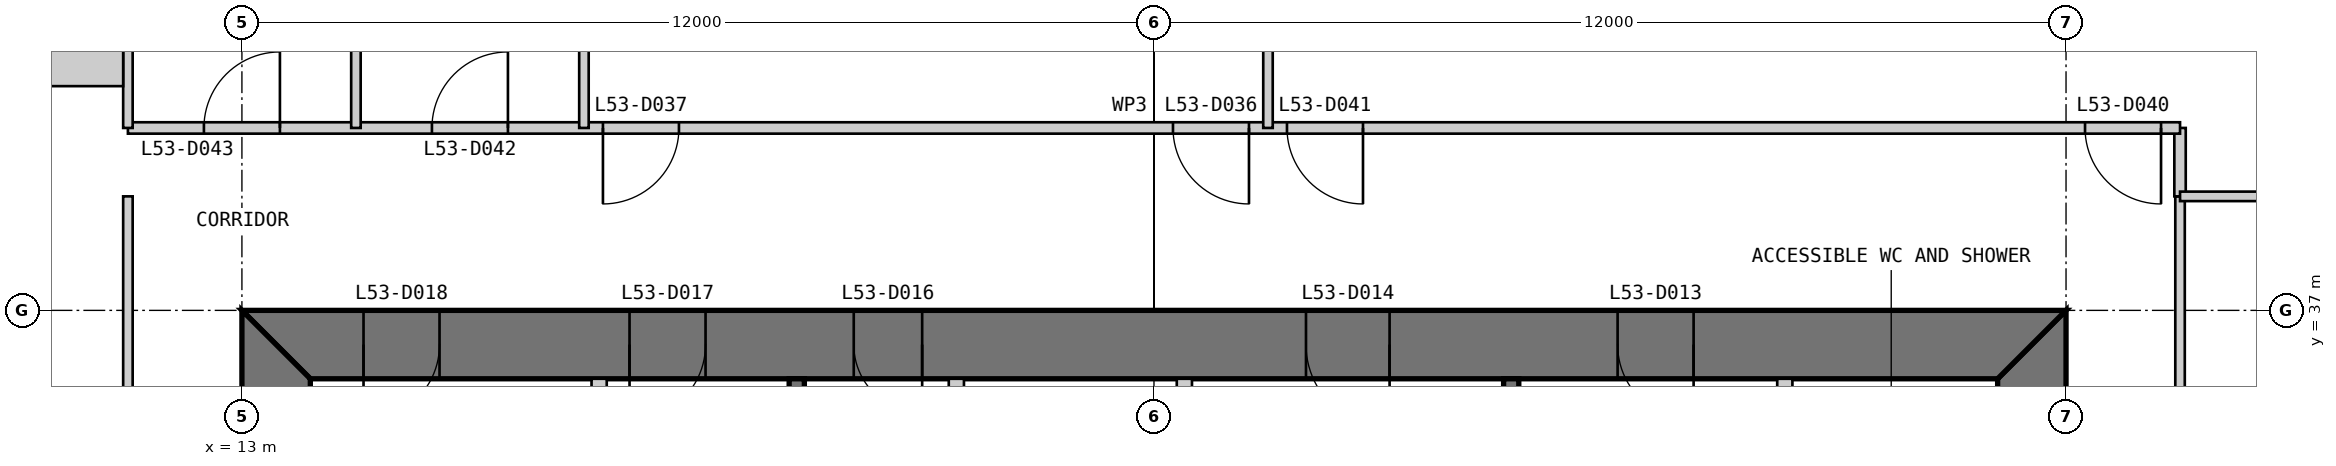
"""IFC4 building model, lengths in metres.
Left out: names, types, materials, properties, quantities, classifications, styles, units other than length and angle.
Written with IfcOpenShell. Run it as: python <this file> out.ifc"""

import sys

from ifc_helpers import new_model, si_unit, direction, frame, frame_2d, origin, place, context, subcontext, project, spatial, polyline, rectangle, outline, extrude, element, fill, save


model = new_model("IFC4")
c1 = context("Model", 3, precision=1e-05, world=origin(), true_north=direction((0.0, 1.0)))
c2 = subcontext(c1, "Body", "Model", "MODEL_VIEW")
j1 = project(units=[si_unit("LENGTHUNIT", "METRE"), si_unit("PLANEANGLEUNIT", "RADIAN")], contexts=[c1])
p1 = place(None, origin())
s1 = spatial("IfcSite", under=j1, at=p1, CompositionType="ELEMENT")
p2 = place(p1, origin())
s2 = spatial("IfcBuilding", under=s1, at=p2, CompositionType="ELEMENT")
p3 = place(p2, frame((0.0, 0.0, 225.8)))
s3 = spatial("IfcBuildingStorey", under=s2, at=p3, CompositionType="ELEMENT", Elevation=225.8)
p4 = place(p3, frame((36.55, 13.9, 0.0), z_axis=(0.0, 0.0, 1.0), x_axis=(0.0, 1.0, 0.0)))
e1 = element("IfcWall", 1, at=p4, inside=s3, PredefinedType="SHEAR", context=c2, shape_type="SweptSolid", body=[
    extrude(outline(polyline([(-0.9, -0.45), (23.1, -0.45), (22.2, 0.45), (0.0, 0.45), (-0.9, -0.45)])), origin(), (0.0, 0.0, 1.0), 4.0),
])
p5 = place(p4, frame((20.2, 0.0, 0.0)))
e2 = element("IfcOpeningElement", 2, at=p5, cuts=e1, PredefinedType="OPENING", context=c2, shape_type="SweptSolid", body=[
    extrude(rectangle(XDim=1.0, YDim=2.2, at=frame_2d((0.5, 1.1))), frame((0.0, 0.46, 0.0), z_axis=(0.0, -1.0, 0.0), x_axis=(1.0, 0.0, 0.0)), (0.0, 0.0, 1.0), 0.92),
])
p6 = place(p4, frame((17.25, 0.0, 0.0)))
e3 = element("IfcOpeningElement", 3, at=p6, cuts=e1, PredefinedType="OPENING", context=c2, shape_type="SweptSolid", body=[
    extrude(rectangle(XDim=0.9, YDim=2.2, at=frame_2d((0.45, 1.1))), frame((0.0, 0.46, 0.0), z_axis=(0.0, -1.0, 0.0), x_axis=(1.0, 0.0, 0.0)), (0.0, 0.0, 1.0), 0.92),
])
p7 = place(p3, frame((37.0, 36.55, 0.0), z_axis=(0.0, 0.0, 1.0), x_axis=(-1.0, 0.0, 0.0)))
e4 = element("IfcWall", 4, at=p7, inside=s3, PredefinedType="SHEAR", context=c2, shape_type="SweptSolid", body=[
    extrude(outline(polyline([(0.0, -0.45), (24.0, -0.45), (23.1, 0.45), (0.9, 0.45), (0.0, -0.45)])), origin(), (0.0, 0.0, 1.0), 4.0),
])
p8 = place(p7, frame((4.9, 0.0, 0.0)))
e5 = element("IfcOpeningElement", 5, at=p8, cuts=e4, PredefinedType="OPENING", context=c2, shape_type="SweptSolid", body=[
    extrude(rectangle(XDim=1.0, YDim=2.2, at=frame_2d((0.5, 1.1))), frame((0.0, 0.46, 0.0), z_axis=(0.0, -1.0, 0.0), x_axis=(1.0, 0.0, 0.0)), (0.0, 0.0, 1.0), 0.92),
])
p9 = place(p7, frame((8.9, 0.0, 0.0)))
e6 = element("IfcOpeningElement", 6, at=p9, cuts=e4, PredefinedType="OPENING", context=c2, shape_type="SweptSolid", body=[
    extrude(rectangle(XDim=1.1, YDim=2.2, at=frame_2d((0.55, 1.1))), frame((0.0, 0.46, 0.0), z_axis=(0.0, -1.0, 0.0), x_axis=(1.0, 0.0, 0.0)), (0.0, 0.0, 1.0), 0.92),
])
p10 = place(p7, frame((15.05, 0.0, 0.0)))
e7 = element("IfcOpeningElement", 7, at=p10, cuts=e4, PredefinedType="OPENING", context=c2, shape_type="SweptSolid", body=[
    extrude(rectangle(XDim=0.9, YDim=2.2, at=frame_2d((0.45, 1.1))), frame((0.0, 0.46, 0.0), z_axis=(0.0, -1.0, 0.0), x_axis=(1.0, 0.0, 0.0)), (0.0, 0.0, 1.0), 0.92),
])
p11 = place(p7, frame((17.9, 0.0, 0.0)))
e8 = element("IfcOpeningElement", 8, at=p11, cuts=e4, PredefinedType="OPENING", context=c2, shape_type="SweptSolid", body=[
    extrude(rectangle(XDim=1.0, YDim=2.2, at=frame_2d((0.5, 1.1))), frame((0.0, 0.46, 0.0), z_axis=(0.0, -1.0, 0.0), x_axis=(1.0, 0.0, 0.0)), (0.0, 0.0, 1.0), 0.92),
])
p12 = place(p7, frame((21.4, 0.0, 0.0)))
e9 = element("IfcOpeningElement", 9, at=p12, cuts=e4, PredefinedType="OPENING", context=c2, shape_type="SweptSolid", body=[
    extrude(rectangle(XDim=1.0, YDim=2.2, at=frame_2d((0.5, 1.1))), frame((0.0, 0.46, 0.0), z_axis=(0.0, -1.0, 0.0), x_axis=(1.0, 0.0, 0.0)), (0.0, 0.0, 1.0), 0.92),
])
p13 = place(p3, frame((13.45, 36.1, 0.0), z_axis=(0.0, 0.0, 1.0), x_axis=(0.0, -1.0, 0.0)))
e10 = element("IfcWall", 10, at=p13, inside=s3, PredefinedType="SHEAR", context=c2, shape_type="SweptSolid", body=[
    extrude(outline(polyline([(-0.9, -0.45), (23.1, -0.45), (22.2, 0.45), (0.0, 0.45), (-0.9, -0.45)])), origin(), (0.0, 0.0, 1.0), 4.0),
])
p14 = place(p13, frame((20.2, 0.0, 0.0)))
e11 = element("IfcOpeningElement", 11, at=p14, cuts=e10, PredefinedType="OPENING", context=c2, shape_type="SweptSolid", body=[
    extrude(rectangle(XDim=1.0, YDim=2.2, at=frame_2d((0.5, 1.1))), frame((0.0, 0.46, 0.0), z_axis=(0.0, -1.0, 0.0), x_axis=(1.0, 0.0, 0.0)), (0.0, 0.0, 1.0), 0.92),
])
p15 = place(p13, frame((17.25, 0.0, 0.0)))
e12 = element("IfcOpeningElement", 12, at=p15, cuts=e10, PredefinedType="OPENING", context=c2, shape_type="SweptSolid", body=[
    extrude(rectangle(XDim=0.9, YDim=2.2, at=frame_2d((0.45, 1.1))), frame((0.0, 0.46, 0.0), z_axis=(0.0, -1.0, 0.0), x_axis=(1.0, 0.0, 0.0)), (0.0, 0.0, 1.0), 0.92),
])
p16 = place(p3, frame((33.3, 36.1, 0.0), z_axis=(0.0, 0.0, 1.0), x_axis=(0.0, -1.0, 0.0)))
e13 = element("IfcWall", 13, at=p16, inside=s3, PredefinedType="PARTITIONING", context=c2, shape_type="SweptSolid", body=[
    extrude(rectangle(XDim=16.1, YDim=0.2, at=frame_2d((8.05, 0.0))), origin(), (0.0, 0.0, 1.0), 3.8),
])
p17 = place(p16, frame((4.4, 0.0, 0.0)))
e14 = element("IfcOpeningElement", 14, at=p17, cuts=e13, PredefinedType="OPENING", context=c2, shape_type="SweptSolid", body=[
    extrude(rectangle(XDim=0.9, YDim=2.2, at=frame_2d((0.45, 1.1))), frame((0.0, 0.11, 0.0), z_axis=(0.0, -1.0, 0.0), x_axis=(1.0, 0.0, 0.0)), (0.0, 0.0, 1.0), 0.22),
])
p18 = place(p3, frame((29.7, 36.1, 0.0), z_axis=(0.0, 0.0, 1.0), x_axis=(0.0, -1.0, 0.0)))
e15 = element("IfcWall", 15, at=p18, inside=s3, PredefinedType="SOLIDWALL", context=c2, shape_type="SweptSolid", body=[
    extrude(rectangle(XDim=16.1, YDim=0.2, at=frame_2d((8.05, 0.0))), origin(), (0.0, 0.0, 1.0), 3.8),
])
p19 = place(p18, frame((7.217, 0.0, 0.0)))
e16 = element("IfcOpeningElement", 16, at=p19, cuts=e15, PredefinedType="OPENING", context=c2, shape_type="SweptSolid", body=[
    extrude(rectangle(XDim=1.1, YDim=2.2, at=frame_2d((0.55, 1.1))), frame((0.0, 0.11, 0.0), z_axis=(0.0, -1.0, 0.0), x_axis=(1.0, 0.0, 0.0)), (0.0, 0.0, 1.0), 0.22),
])
p20 = place(p18, frame((10.55, 0.0, 0.0)))
e17 = element("IfcOpeningElement", 17, at=p20, cuts=e15, PredefinedType="OPENING", context=c2, shape_type="SweptSolid", body=[
    extrude(rectangle(XDim=1.1, YDim=2.2, at=frame_2d((0.55, 1.1))), frame((0.0, 0.11, 0.0), z_axis=(0.0, -1.0, 0.0), x_axis=(1.0, 0.0, 0.0)), (0.0, 0.0, 1.0), 0.22),
])
p21 = place(p18, frame((13.883, 0.0, 0.0)))
e18 = element("IfcOpeningElement", 18, at=p21, cuts=e15, PredefinedType="OPENING", context=c2, shape_type="SweptSolid", body=[
    extrude(rectangle(XDim=1.1, YDim=2.2, at=frame_2d((0.55, 1.1))), frame((0.0, 0.11, 0.0), z_axis=(0.0, -1.0, 0.0), x_axis=(1.0, 0.0, 0.0)), (0.0, 0.0, 1.0), 0.22),
])
p22 = place(p3, frame((25.4, 36.1, 0.0), z_axis=(0.0, 0.0, 1.0), x_axis=(0.0, -1.0, 0.0)))
e19 = element("IfcWall", 19, at=p22, inside=s3, PredefinedType="PARTITIONING", context=c2, shape_type="SweptSolid", body=[
    extrude(rectangle(XDim=3.3, YDim=0.2, at=frame_2d((1.65, 0.0))), origin(), (0.0, 0.0, 1.0), 3.8),
])
p23 = place(p22, frame((0.9, 0.0, 0.0)))
e20 = element("IfcOpeningElement", 20, at=p23, cuts=e19, PredefinedType="OPENING", context=c2, shape_type="SweptSolid", body=[
    extrude(rectangle(XDim=1.1, YDim=2.2, at=frame_2d((0.55, 1.1))), frame((0.0, 0.11, 0.0), z_axis=(0.0, -1.0, 0.0), x_axis=(1.0, 0.0, 0.0)), (0.0, 0.0, 1.0), 0.22),
])
p24 = place(p3, frame((22.4, 36.1, 0.0), z_axis=(0.0, 0.0, 1.0), x_axis=(0.0, -1.0, 0.0)))
e21 = element("IfcWall", 21, at=p24, inside=s3, PredefinedType="PARTITIONING", context=c2, shape_type="SweptSolid", body=[
    extrude(rectangle(XDim=3.3, YDim=0.2, at=frame_2d((1.65, 0.0))), origin(), (0.0, 0.0, 1.0), 3.8),
])
p25 = place(p3, frame((20.3, 36.1, 0.0), z_axis=(0.0, 0.0, 1.0), x_axis=(0.0, -1.0, 0.0)))
e22 = element("IfcWall", 22, at=p25, inside=s3, PredefinedType="SOLIDWALL", context=c2, shape_type="SweptSolid", body=[
    extrude(rectangle(XDim=6.1, YDim=0.2, at=frame_2d((3.05, 0.0))), origin(), (0.0, 0.0, 1.0), 3.8),
])
p26 = place(p3, frame((17.7, 36.1, 0.0), z_axis=(0.0, 0.0, 1.0), x_axis=(0.0, -1.0, 0.0)))
e23 = element("IfcWall", 23, at=p26, inside=s3, PredefinedType="PARTITIONING", context=c2, shape_type="SweptSolid", body=[
    extrude(rectangle(XDim=6.1, YDim=0.2, at=frame_2d((3.05, 0.0))), origin(), (0.0, 0.0, 1.0), 3.8),
])
p27 = place(p3, frame((38.5, 35.5, 0.0), z_axis=(0.0, 0.0, 1.0), x_axis=(0.0, 1.0, 0.0)))
e24 = element("IfcWall", 24, at=p27, inside=s3, PredefinedType="PARTITIONING", context=c2, shape_type="SweptSolid", body=[
    extrude(rectangle(XDim=3.0, YDim=0.125, at=frame_2d((1.5, 0.0))), origin(), (0.0, 0.0, 1.0), 3.85),
])
p28 = place(p3, frame((38.5, 38.5, 0.0), z_axis=(0.0, 0.0, 1.0), x_axis=(0.0, 1.0, 0.0)))
e25 = element("IfcWall", 25, at=p28, inside=s3, PredefinedType="PARTITIONING", context=c2, shape_type="SweptSolid", body=[
    extrude(rectangle(XDim=0.9, YDim=0.15, at=frame_2d((0.45, 0.0))), origin(), (0.0, 0.0, 1.0), 3.85),
])
p29 = place(p3, frame((38.5, 39.4, 0.0), z_axis=(0.0, 0.0, 1.0), x_axis=(-1.0, 0.0, 0.0)))
e26 = element("IfcWall", 26, at=p29, inside=s3, PredefinedType="PARTITIONING", context=c2, shape_type="SweptSolid", body=[
    extrude(rectangle(XDim=27.0, YDim=0.15, at=frame_2d((13.5, 0.0))), origin(), (0.0, 0.0, 1.0), 3.85),
])
p30 = place(p29, frame((12.25, 0.0, 0.0)))
e27 = element("IfcOpeningElement", 27, at=p30, cuts=e26, PredefinedType="OPENING", context=c2, shape_type="SweptSolid", body=[
    extrude(rectangle(XDim=1.0, YDim=2.2, at=frame_2d((0.5, 1.1))), frame((0.0, 0.085, 0.0), z_axis=(0.0, -1.0, 0.0), x_axis=(1.0, 0.0, 0.0)), (0.0, 0.0, 1.0), 0.17),
])
p31 = place(p29, frame((19.75, 0.0, 0.0)))
e28 = element("IfcOpeningElement", 28, at=p31, cuts=e26, PredefinedType="OPENING", context=c2, shape_type="SweptSolid", body=[
    extrude(rectangle(XDim=1.0, YDim=2.2, at=frame_2d((0.5, 1.1))), frame((0.0, 0.085, 0.0), z_axis=(0.0, -1.0, 0.0), x_axis=(1.0, 0.0, 0.0)), (0.0, 0.0, 1.0), 0.17),
])
p32 = place(p29, frame((0.25, 0.0, 0.0)))
e29 = element("IfcOpeningElement", 29, at=p32, cuts=e26, PredefinedType="OPENING", context=c2, shape_type="SweptSolid", body=[
    extrude(rectangle(XDim=1.0, YDim=2.2, at=frame_2d((0.5, 1.1))), frame((0.0, 0.085, 0.0), z_axis=(0.0, -1.0, 0.0), x_axis=(1.0, 0.0, 0.0)), (0.0, 0.0, 1.0), 0.17),
])
p33 = place(p29, frame((10.75, 0.0, 0.0)))
e30 = element("IfcOpeningElement", 30, at=p33, cuts=e26, PredefinedType="OPENING", context=c2, shape_type="SweptSolid", body=[
    extrude(rectangle(XDim=1.0, YDim=2.2, at=frame_2d((0.5, 1.1))), frame((0.0, 0.085, 0.0), z_axis=(0.0, -1.0, 0.0), x_axis=(1.0, 0.0, 0.0)), (0.0, 0.0, 1.0), 0.17),
])
p34 = place(p29, frame((22.0, 0.0, 0.0)))
e31 = element("IfcOpeningElement", 31, at=p34, cuts=e26, PredefinedType="OPENING", context=c2, shape_type="SweptSolid", body=[
    extrude(rectangle(XDim=1.0, YDim=2.2, at=frame_2d((0.5, 1.1))), frame((0.0, 0.085, 0.0), z_axis=(0.0, -1.0, 0.0), x_axis=(1.0, 0.0, 0.0)), (0.0, 0.0, 1.0), 0.17),
])
p35 = place(p29, frame((25.0, 0.0, 0.0)))
e32 = element("IfcOpeningElement", 32, at=p35, cuts=e26, PredefinedType="OPENING", context=c2, shape_type="SweptSolid", body=[
    extrude(rectangle(XDim=1.0, YDim=2.2, at=frame_2d((0.5, 1.1))), frame((0.0, 0.085, 0.0), z_axis=(0.0, -1.0, 0.0), x_axis=(1.0, 0.0, 0.0)), (0.0, 0.0, 1.0), 0.17),
])
p36 = place(p3, frame((49.85, 38.5, 0.0), z_axis=(0.0, 0.0, 1.0), x_axis=(-1.0, 0.0, 0.0)))
e33 = element("IfcWall", 33, at=p36, inside=s3, PredefinedType="PARTITIONING", context=c2, shape_type="SweptSolid", body=[
    extrude(rectangle(XDim=11.35, YDim=0.125, at=frame_2d((5.675, 0.0))), origin(), (0.0, 0.0, 1.0), 3.85),
])
p37 = place(p3, frame((26.5, 43.0, 0.0), z_axis=(0.0, 0.0, 1.0), x_axis=(0.0, -1.0, 0.0)))
e34 = element("IfcWall", 34, at=p37, inside=s3, PredefinedType="PARTITIONING", context=c2, shape_type="SweptSolid", body=[
    extrude(rectangle(XDim=3.6, YDim=0.125, at=frame_2d((1.8, 0.0))), origin(), (0.0, 0.0, 1.0), 3.85),
])
p38 = place(p3, frame((17.5, 49.85, 0.0), z_axis=(0.0, 0.0, 1.0), x_axis=(0.0, -1.0, 0.0)))
e35 = element("IfcWall", 35, at=p38, inside=s3, PredefinedType="PARTITIONING", context=c2, shape_type="SweptSolid", body=[
    extrude(rectangle(XDim=10.45, YDim=0.125, at=frame_2d((5.225, 0.0))), origin(), (0.0, 0.0, 1.0), 3.85),
])
p39 = place(p3, frame((14.5, 43.0, 0.0), z_axis=(0.0, 0.0, 1.0), x_axis=(0.0, -1.0, 0.0)))
e36 = element("IfcWall", 36, at=p39, inside=s3, PredefinedType="PARTITIONING", context=c2, shape_type="SweptSolid", body=[
    extrude(rectangle(XDim=3.6, YDim=0.125, at=frame_2d((1.8, 0.0))), origin(), (0.0, 0.0, 1.0), 3.85),
])
p40 = place(p3, frame((11.5, 49.85, 0.0), z_axis=(0.0, 0.0, 1.0), x_axis=(0.0, -1.0, 0.0)))
e37 = element("IfcWall", 37, at=p40, inside=s3, PredefinedType="PARTITIONING", context=c2, shape_type="SweptSolid", body=[
    extrude(rectangle(XDim=10.45, YDim=0.125, at=frame_2d((5.225, 0.0))), origin(), (0.0, 0.0, 1.0), 3.85),
])
p41 = place(p3, frame((11.5, 38.5, 0.0), z_axis=(0.0, 0.0, 1.0), x_axis=(0.0, -1.0, 0.0)))
e38 = element("IfcWall", 38, at=p41, inside=s3, PredefinedType="PARTITIONING", context=c2, shape_type="SweptSolid", body=[
    extrude(rectangle(XDim=3.0, YDim=0.125, at=frame_2d((1.5, 0.0))), origin(), (0.0, 0.0, 1.0), 3.85),
])
p42 = place(p3, frame((11.438, 41.0, 0.0), z_axis=(0.0, 0.0, 1.0), x_axis=(-1.0, 0.0, 0.0)))
e39 = element("IfcWall", 39, at=p42, inside=s3, PredefinedType="PARTITIONING", context=c2, shape_type="SweptSolid", body=[
    extrude(rectangle(XDim=1.438, YDim=2.1, at=frame_2d((0.719, 0.0))), origin(), (0.0, 0.0, 1.0), 3.85),
])
p43 = place(p8, origin())
e40 = element("IfcDoor", 40, at=p43, inside=s3, OperationType="SINGLE_SWING_LEFT", PredefinedType="DOOR", context=c2, shape_type="SweptSolid", body=[
    extrude(rectangle(XDim=1.0, YDim=2.2, at=frame_2d((0.5, 1.1))), frame((0.0, 0.025, 0.0), z_axis=(0.0, -1.0, 0.0), x_axis=(1.0, 0.0, 0.0)), (0.0, 0.0, 1.0), 0.05),
    extrude(outline(polyline([(0.0, 0.0), (0.04, 0.0), (0.04, 2.16), (0.96, 2.16), (0.96, 0.0), (1.0, 0.0), (1.0, 2.2), (0.0, 2.2), (0.0, 0.0)])), frame((0.0, 0.3, 0.0), z_axis=(0.0, -1.0, 0.0), x_axis=(1.0, 0.0, 0.0)), (0.0, 0.0, 1.0), 0.6),
])
fill(e5, e40)
p44 = place(p9, origin())
e41 = element("IfcDoor", 41, at=p44, inside=s3, OperationType="SINGLE_SWING_LEFT", PredefinedType="DOOR", context=c2, shape_type="SweptSolid", body=[
    extrude(rectangle(XDim=1.1, YDim=2.2, at=frame_2d((0.55, 1.1))), frame((0.0, 0.025, 0.0), z_axis=(0.0, -1.0, 0.0), x_axis=(1.0, 0.0, 0.0)), (0.0, 0.0, 1.0), 0.05),
    extrude(outline(polyline([(0.0, 0.0), (0.04, 0.0), (0.04, 2.16), (1.06, 2.16), (1.06, 0.0), (1.1, 0.0), (1.1, 2.2), (0.0, 2.2), (0.0, 0.0)])), frame((0.0, 0.3, 0.0), z_axis=(0.0, -1.0, 0.0), x_axis=(1.0, 0.0, 0.0)), (0.0, 0.0, 1.0), 0.6),
])
fill(e6, e41)
p45 = place(p10, origin())
e42 = element("IfcDoor", 42, at=p45, inside=s3, OperationType="SINGLE_SWING_LEFT", PredefinedType="DOOR", context=c2, shape_type="SweptSolid", body=[
    extrude(rectangle(XDim=0.9, YDim=2.2, at=frame_2d((0.45, 1.1))), frame((0.0, 0.025, 0.0), z_axis=(0.0, -1.0, 0.0), x_axis=(1.0, 0.0, 0.0)), (0.0, 0.0, 1.0), 0.05),
    extrude(outline(polyline([(0.0, 0.0), (0.04, 0.0), (0.04, 2.16), (0.86, 2.16), (0.86, 0.0), (0.9, 0.0), (0.9, 2.2), (0.0, 2.2), (0.0, 0.0)])), frame((0.0, 0.3, 0.0), z_axis=(0.0, -1.0, 0.0), x_axis=(1.0, 0.0, 0.0)), (0.0, 0.0, 1.0), 0.6),
])
fill(e7, e42)
p46 = place(p11, origin())
e43 = element("IfcDoor", 43, at=p46, inside=s3, OperationType="SINGLE_SWING_RIGHT", PredefinedType="DOOR", context=c2, shape_type="SweptSolid", body=[
    extrude(rectangle(XDim=1.0, YDim=2.2, at=frame_2d((0.5, 1.1))), frame((0.0, 0.025, 0.0), z_axis=(0.0, -1.0, 0.0), x_axis=(1.0, 0.0, 0.0)), (0.0, 0.0, 1.0), 0.05),
    extrude(outline(polyline([(0.0, 0.0), (0.04, 0.0), (0.04, 2.16), (0.96, 2.16), (0.96, 0.0), (1.0, 0.0), (1.0, 2.2), (0.0, 2.2), (0.0, 0.0)])), frame((0.0, 0.3, 0.0), z_axis=(0.0, -1.0, 0.0), x_axis=(1.0, 0.0, 0.0)), (0.0, 0.0, 1.0), 0.6),
])
fill(e8, e43)
p47 = place(p12, origin())
e44 = element("IfcDoor", 44, at=p47, inside=s3, OperationType="SINGLE_SWING_RIGHT", PredefinedType="DOOR", context=c2, shape_type="SweptSolid", body=[
    extrude(rectangle(XDim=1.0, YDim=2.2, at=frame_2d((0.5, 1.1))), frame((0.0, 0.025, 0.0), z_axis=(0.0, -1.0, 0.0), x_axis=(1.0, 0.0, 0.0)), (0.0, 0.0, 1.0), 0.05),
    extrude(outline(polyline([(0.0, 0.0), (0.04, 0.0), (0.04, 2.16), (0.96, 2.16), (0.96, 0.0), (1.0, 0.0), (1.0, 2.2), (0.0, 2.2), (0.0, 0.0)])), frame((0.0, 0.3, 0.0), z_axis=(0.0, -1.0, 0.0), x_axis=(1.0, 0.0, 0.0)), (0.0, 0.0, 1.0), 0.6),
])
fill(e9, e44)
p48 = place(p30, origin())
e45 = element("IfcDoor", 45, at=p48, inside=s3, OperationType="SINGLE_SWING_LEFT", PredefinedType="DOOR", context=c2, shape_type="SweptSolid", body=[
    extrude(rectangle(XDim=1.0, YDim=2.2, at=frame_2d((0.5, 1.1))), frame((0.0, 0.025, 0.0), z_axis=(0.0, -1.0, 0.0), x_axis=(1.0, 0.0, 0.0)), (0.0, 0.0, 1.0), 0.05),
])
fill(e27, e45)
p49 = place(p31, origin())
e46 = element("IfcDoor", 46, at=p49, inside=s3, OperationType="SINGLE_SWING_RIGHT", PredefinedType="DOOR", context=c2, shape_type="SweptSolid", body=[
    extrude(rectangle(XDim=1.0, YDim=2.2, at=frame_2d((0.5, 1.1))), frame((0.0, 0.025, 0.0), z_axis=(0.0, -1.0, 0.0), x_axis=(1.0, 0.0, 0.0)), (0.0, 0.0, 1.0), 0.05),
])
fill(e28, e46)
p50 = place(p32, origin())
e47 = element("IfcDoor", 47, at=p50, inside=s3, OperationType="SINGLE_SWING_LEFT", PredefinedType="DOOR", context=c2, shape_type="SweptSolid", body=[
    extrude(rectangle(XDim=1.0, YDim=2.2, at=frame_2d((0.5, 1.1))), frame((0.0, 0.025, 0.0), z_axis=(0.0, -1.0, 0.0), x_axis=(1.0, 0.0, 0.0)), (0.0, 0.0, 1.0), 0.05),
])
fill(e29, e47)
p51 = place(p33, origin())
e48 = element("IfcDoor", 48, at=p51, inside=s3, OperationType="SINGLE_SWING_LEFT", PredefinedType="DOOR", context=c2, shape_type="SweptSolid", body=[
    extrude(rectangle(XDim=1.0, YDim=2.2, at=frame_2d((0.5, 1.1))), frame((0.0, 0.025, 0.0), z_axis=(0.0, -1.0, 0.0), x_axis=(1.0, 0.0, 0.0)), (0.0, 0.0, 1.0), 0.05),
])
fill(e30, e48)
p52 = place(p34, frame((1.0, 0.0, 0.0), z_axis=(0.0, 0.0, 1.0), x_axis=(-1.0, 0.0, 0.0)))
e49 = element("IfcDoor", 49, at=p52, inside=s3, OperationType="SINGLE_SWING_RIGHT", PredefinedType="DOOR", context=c2, shape_type="SweptSolid", body=[
    extrude(rectangle(XDim=1.0, YDim=2.2, at=frame_2d((0.5, 1.1))), frame((0.0, 0.025, 0.0), z_axis=(0.0, -1.0, 0.0), x_axis=(1.0, 0.0, 0.0)), (0.0, 0.0, 1.0), 0.05),
])
fill(e31, e49)
p53 = place(p35, frame((1.0, 0.0, 0.0), z_axis=(0.0, 0.0, 1.0), x_axis=(-1.0, 0.0, 0.0)))
e50 = element("IfcDoor", 50, at=p53, inside=s3, OperationType="SINGLE_SWING_RIGHT", PredefinedType="DOOR", context=c2, shape_type="SweptSolid", body=[
    extrude(rectangle(XDim=1.0, YDim=2.2, at=frame_2d((0.5, 1.1))), frame((0.0, 0.025, 0.0), z_axis=(0.0, -1.0, 0.0), x_axis=(1.0, 0.0, 0.0)), (0.0, 0.0, 1.0), 0.05),
])
fill(e32, e50)
save(model, sys.argv[1])
